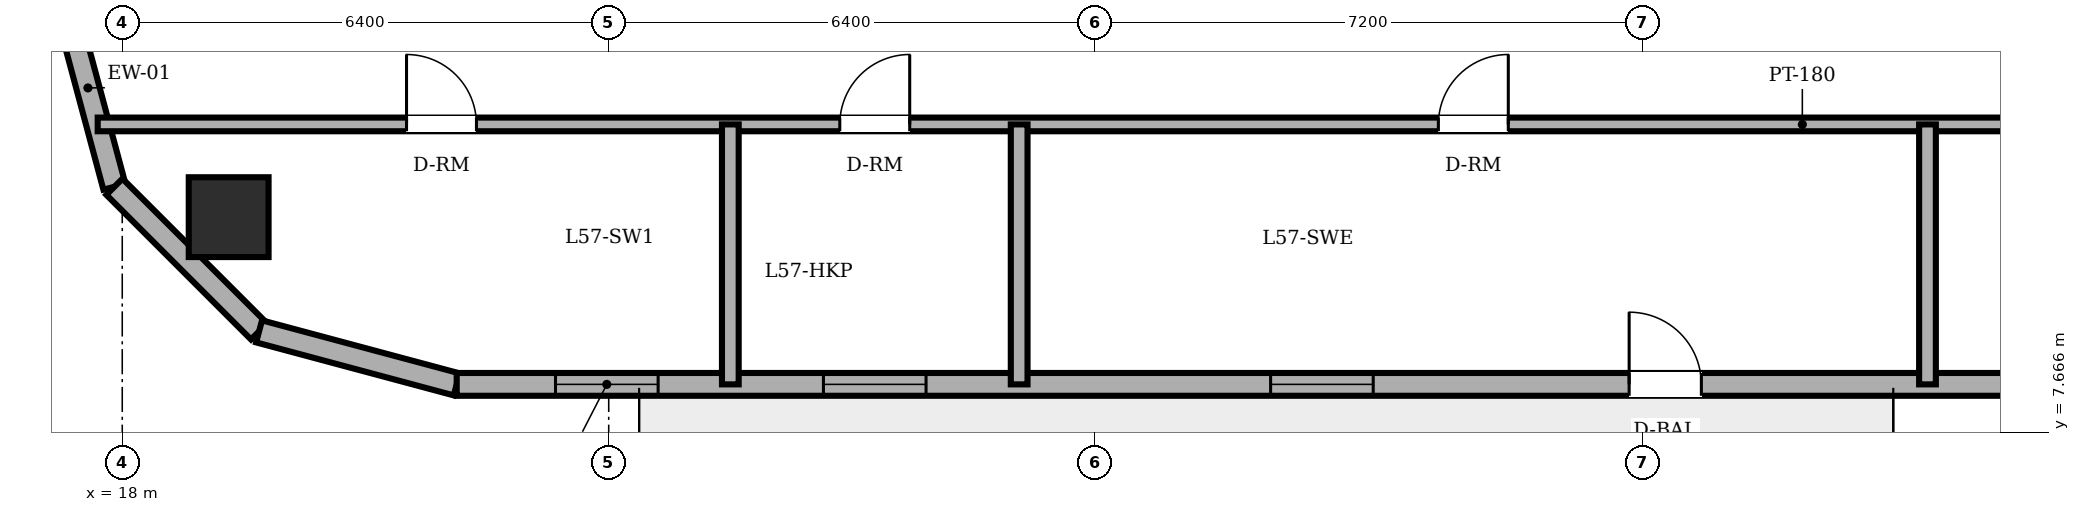
"""IFC4 building model, lengths in metres.
Left out: names, types, materials, properties, quantities, classifications, styles, units other than length and angle.
Written with IfcOpenShell. Run it as: python <this file> out.ifc"""

import sys

from ifc_helpers import new_model, si_unit, direction, frame, frame_2d, origin, origin_2d, place, context, subcontext, project, spatial, rectangle, circle, extrude, element, fill, save


model = new_model("IFC4")
c1 = context("Model", 3, precision=1e-05, world=origin(), true_north=direction((0.0, 1.0)))
c2 = subcontext(c1, "Body", "Model", "MODEL_VIEW")
j1 = project(units=[si_unit("LENGTHUNIT", "METRE"), si_unit("PLANEANGLEUNIT", "RADIAN")], contexts=[c1])
p1 = place(None, origin())
s1 = spatial("IfcSite", under=j1, at=p1, CompositionType="ELEMENT")
p2 = place(p1, origin())
s2 = spatial("IfcBuilding", under=s1, at=p2, CompositionType="ELEMENT")
p3 = place(p2, frame((0.0, 0.0, 219.3)))
s3 = spatial("IfcBuildingStorey", under=s2, at=p3, CompositionType="ELEMENT", Elevation=219.3)
p4 = place(p3, frame((19.4, 10.5, 0.0), z_axis=(0.0, 0.0, 1.0), x_axis=(1.0, 0.0, 0.0)))
e1 = element("IfcColumn", 1, at=p4, inside=s3, PredefinedType="COLUMN", context=c2, shape_type="SweptSolid", body=[
    extrude(circle(Radius=0.525, at=origin_2d()), origin(), (0.0, 0.0, 1.0), 3.6),
])
p5 = place(p3, frame((17.2, 13.5, 0.0), z_axis=(0.0, 0.0, 1.0), x_axis=(0.258932525951, -0.965895412042, 0.0)))
e2 = element("IfcWall", 2, at=p5, inside=s3, PredefinedType="SOLIDWALL", context=c2, shape_type="SweptSolid", body=[
    extrude(rectangle(XDim=2.692, YDim=0.3, at=frame_2d((1.346, 0.0))), origin(), (0.0, 0.0, 1.0), 3.4),
])
p6 = place(p3, frame((17.897, 10.9, 0.0), z_axis=(0.0, 0.0, 1.0), x_axis=(0.707152139074, -0.70706142039, 0.0)))
e3 = element("IfcWall", 3, at=p6, inside=s3, PredefinedType="SOLIDWALL", context=c2, shape_type="SweptSolid", body=[
    extrude(rectangle(XDim=2.691, YDim=0.3, at=frame_2d((1.346, 0.0))), origin(), (0.0, 0.0, 1.0), 3.4),
])
p7 = place(p3, frame((19.8, 8.997, 0.0), z_axis=(0.0, 0.0, 1.0), x_axis=(0.965889330541, -0.258955210695, 0.0)))
e4 = element("IfcWall", 4, at=p7, inside=s3, PredefinedType="SOLIDWALL", context=c2, shape_type="SweptSolid", body=[
    extrude(rectangle(XDim=2.692, YDim=0.3, at=frame_2d((1.346, 0.0))), origin(), (0.0, 0.0, 1.0), 3.4),
])
p8 = place(p3, frame((22.4, 8.3, 0.0), z_axis=(0.0, 0.0, 1.0), x_axis=(1.0, 0.0, 0.0)))
e5 = element("IfcWall", 5, at=p8, inside=s3, PredefinedType="SOLIDWALL", context=c2, shape_type="SweptSolid", body=[
    extrude(rectangle(XDim=32.485, YDim=0.3, at=frame_2d((16.243, 0.0))), origin(), (0.0, 0.0, 1.0), 3.4),
])
p9 = place(p8, frame((15.425, 0.0, 0.0)))
e6 = element("IfcOpeningElement", 6, at=p9, cuts=e5, PredefinedType="OPENING", context=c2, shape_type="SweptSolid", body=[
    extrude(rectangle(XDim=0.95, YDim=2.2, at=frame_2d((0.475, 1.1))), frame((0.0, 0.16, 0.0), z_axis=(0.0, -1.0, 0.0), x_axis=(1.0, 0.0, 0.0)), (0.0, 0.0, 1.0), 0.32),
])
p10 = place(p8, frame((1.3, 0.0, 0.85)))
e7 = element("IfcOpeningElement", 7, at=p10, cuts=e5, PredefinedType="OPENING", context=c2, shape_type="SweptSolid", body=[
    extrude(rectangle(XDim=1.35, YDim=1.55, at=frame_2d((0.675, 0.775))), frame((0.0, 0.16, 0.0), z_axis=(0.0, -1.0, 0.0), x_axis=(1.0, 0.0, 0.0)), (0.0, 0.0, 1.0), 0.32),
])
p11 = place(p8, frame((4.825, 0.0, 0.85)))
e8 = element("IfcOpeningElement", 8, at=p11, cuts=e5, PredefinedType="OPENING", context=c2, shape_type="SweptSolid", body=[
    extrude(rectangle(XDim=1.35, YDim=1.55, at=frame_2d((0.675, 0.775))), frame((0.0, 0.16, 0.0), z_axis=(0.0, -1.0, 0.0), x_axis=(1.0, 0.0, 0.0)), (0.0, 0.0, 1.0), 0.32),
])
p12 = place(p8, frame((10.708, 0.0, 0.85)))
e9 = element("IfcOpeningElement", 9, at=p12, cuts=e5, PredefinedType="OPENING", context=c2, shape_type="SweptSolid", body=[
    extrude(rectangle(XDim=1.35, YDim=1.55, at=frame_2d((0.675, 0.775))), frame((0.0, 0.16, 0.0), z_axis=(0.0, -1.0, 0.0), x_axis=(1.0, 0.0, 0.0)), (0.0, 0.0, 1.0), 0.32),
])
p13 = place(p8, frame((22.937, 0.0, 0.85)))
e10 = element("IfcOpeningElement", 10, at=p13, cuts=e5, PredefinedType="OPENING", context=c2, shape_type="SweptSolid", body=[
    extrude(rectangle(XDim=1.35, YDim=1.55, at=frame_2d((0.675, 0.775))), frame((0.0, 0.16, 0.0), z_axis=(0.0, -1.0, 0.0), x_axis=(1.0, 0.0, 0.0)), (0.0, 0.0, 1.0), 0.32),
])
p14 = place(p8, frame((27.198, 0.0, 0.85)))
e11 = element("IfcOpeningElement", 11, at=p14, cuts=e5, PredefinedType="OPENING", context=c2, shape_type="SweptSolid", body=[
    extrude(rectangle(XDim=1.35, YDim=1.55, at=frame_2d((0.675, 0.775))), frame((0.0, 0.16, 0.0), z_axis=(0.0, -1.0, 0.0), x_axis=(1.0, 0.0, 0.0)), (0.0, 0.0, 1.0), 0.32),
])
p15 = place(p3, frame((17.677, 11.72, 0.0), z_axis=(0.0, 0.0, 1.0), x_axis=(1.0, 0.0, 0.0)))
e12 = element("IfcWall", 12, at=p15, inside=s3, PredefinedType="PARTITIONING", context=c2, shape_type="SweptSolid", body=[
    extrude(rectangle(XDim=44.853, YDim=0.18, at=frame_2d((22.427, 0.0))), origin(), (0.0, 0.0, 1.0), 3.4),
])
p16 = place(p15, frame((9.763, 0.0, 0.0)))
e13 = element("IfcOpeningElement", 13, at=p16, cuts=e12, PredefinedType="OPENING", context=c2, shape_type="SweptSolid", body=[
    extrude(rectangle(XDim=0.92, YDim=2.1, at=frame_2d((0.46, 1.05))), frame((0.0, 0.1, 0.0), z_axis=(0.0, -1.0, 0.0), x_axis=(1.0, 0.0, 0.0)), (0.0, 0.0, 1.0), 0.2),
])
p17 = place(p15, frame((26.113, 0.0, 0.0)))
e14 = element("IfcOpeningElement", 14, at=p17, cuts=e12, PredefinedType="OPENING", context=c2, shape_type="SweptSolid", body=[
    extrude(rectangle(XDim=0.92, YDim=2.1, at=frame_2d((0.46, 1.05))), frame((0.0, 0.1, 0.0), z_axis=(0.0, -1.0, 0.0), x_axis=(1.0, 0.0, 0.0)), (0.0, 0.0, 1.0), 0.2),
])
p18 = place(p15, frame((4.063, 0.0, 0.0)))
e15 = element("IfcOpeningElement", 15, at=p18, cuts=e12, PredefinedType="OPENING", context=c2, shape_type="SweptSolid", body=[
    extrude(rectangle(XDim=0.92, YDim=2.1, at=frame_2d((0.46, 1.05))), frame((0.0, 0.1, 0.0), z_axis=(0.0, -1.0, 0.0), x_axis=(1.0, 0.0, 0.0)), (0.0, 0.0, 1.0), 0.2),
])
p19 = place(p15, frame((17.638, 0.0, 0.0)))
e16 = element("IfcOpeningElement", 16, at=p19, cuts=e12, PredefinedType="OPENING", context=c2, shape_type="SweptSolid", body=[
    extrude(rectangle(XDim=0.92, YDim=2.1, at=frame_2d((0.46, 1.05))), frame((0.0, 0.1, 0.0), z_axis=(0.0, -1.0, 0.0), x_axis=(1.0, 0.0, 0.0)), (0.0, 0.0, 1.0), 0.2),
])
for number, where, z_axis, x_axis in (
    (17, (26.0, 8.3, 0.0), (0.0, 0.0, 1.0), (0.0, 1.0, 0.0)),
    (18, (29.8, 8.3, 0.0), (0.0, 0.0, 1.0), (0.0, 1.0, 0.0)),
    (19, (41.75, 8.3, 0.0), (0.0, 0.0, 1.0), (0.0, 1.0, 0.0)),
):
    element("IfcWall", number, at=place(p3, frame(where, z_axis=z_axis, x_axis=x_axis)), inside=s3, PredefinedType="PARTITIONING", context=c2, shape_type="SweptSolid", body=[
        extrude(rectangle(XDim=3.42, YDim=0.22, at=frame_2d((1.71, 0.0))), origin(), (0.0, 0.0, 1.0), 3.4),
    ])
p20 = place(p9, origin())
e20 = element("IfcDoor", 20, at=p20, inside=s3, OperationType="SINGLE_SWING_LEFT", PredefinedType="DOOR", context=c2, shape_type="SweptSolid", body=[
    extrude(rectangle(XDim=0.95, YDim=2.2, at=frame_2d((0.475, 1.1))), frame((0.0, 0.025, 0.0), z_axis=(0.0, -1.0, 0.0), x_axis=(1.0, 0.0, 0.0)), (0.0, 0.0, 1.0), 0.05),
])
fill(e6, e20)
p21 = place(p10, origin())
e21 = element("IfcWindow", 21, at=p21, inside=s3, PartitioningType="SINGLE_PANEL", PredefinedType="WINDOW", context=c2, shape_type="SweptSolid", body=[
    extrude(rectangle(XDim=1.35, YDim=1.55, at=frame_2d((0.675, 0.775))), frame((0.0, 0.03, 0.0), z_axis=(0.0, -1.0, 0.0), x_axis=(1.0, 0.0, 0.0)), (0.0, 0.0, 1.0), 0.06),
])
fill(e7, e21)
p22 = place(p11, origin())
e22 = element("IfcWindow", 22, at=p22, inside=s3, PartitioningType="SINGLE_PANEL", PredefinedType="WINDOW", context=c2, shape_type="SweptSolid", body=[
    extrude(rectangle(XDim=1.35, YDim=1.55, at=frame_2d((0.675, 0.775))), frame((0.0, 0.03, 0.0), z_axis=(0.0, -1.0, 0.0), x_axis=(1.0, 0.0, 0.0)), (0.0, 0.0, 1.0), 0.06),
])
fill(e8, e22)
p23 = place(p12, origin())
e23 = element("IfcWindow", 23, at=p23, inside=s3, PartitioningType="SINGLE_PANEL", PredefinedType="WINDOW", context=c2, shape_type="SweptSolid", body=[
    extrude(rectangle(XDim=1.35, YDim=1.55, at=frame_2d((0.675, 0.775))), frame((0.0, 0.03, 0.0), z_axis=(0.0, -1.0, 0.0), x_axis=(1.0, 0.0, 0.0)), (0.0, 0.0, 1.0), 0.06),
])
fill(e9, e23)
p24 = place(p16, origin())
e24 = element("IfcDoor", 24, at=p24, inside=s3, OperationType="SINGLE_SWING_RIGHT", PredefinedType="DOOR", context=c2, shape_type="SweptSolid", body=[
    extrude(rectangle(XDim=0.92, YDim=2.1, at=frame_2d((0.46, 1.05))), frame((0.0, 0.025, 0.0), z_axis=(0.0, -1.0, 0.0), x_axis=(1.0, 0.0, 0.0)), (0.0, 0.0, 1.0), 0.05),
])
fill(e13, e24)
p25 = place(p18, origin())
e25 = element("IfcDoor", 25, at=p25, inside=s3, OperationType="SINGLE_SWING_LEFT", PredefinedType="DOOR", context=c2, shape_type="SweptSolid", body=[
    extrude(rectangle(XDim=0.92, YDim=2.1, at=frame_2d((0.46, 1.05))), frame((0.0, 0.025, 0.0), z_axis=(0.0, -1.0, 0.0), x_axis=(1.0, 0.0, 0.0)), (0.0, 0.0, 1.0), 0.05),
])
fill(e15, e25)
p26 = place(p19, origin())
e26 = element("IfcDoor", 26, at=p26, inside=s3, OperationType="SINGLE_SWING_RIGHT", PredefinedType="DOOR", context=c2, shape_type="SweptSolid", body=[
    extrude(rectangle(XDim=0.92, YDim=2.1, at=frame_2d((0.46, 1.05))), frame((0.0, 0.025, 0.0), z_axis=(0.0, -1.0, 0.0), x_axis=(1.0, 0.0, 0.0)), (0.0, 0.0, 1.0), 0.05),
])
fill(e16, e26)
save(model, sys.argv[1])
